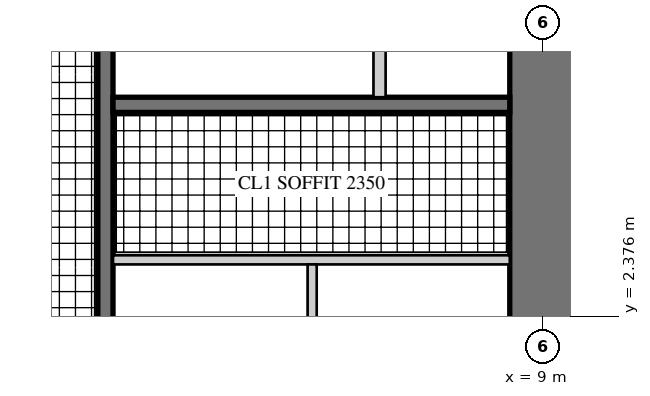
"""IFC4 building model, lengths in metres.
Left out: names, types, materials, properties, quantities, classifications, styles, units other than length and angle.
Written with IfcOpenShell. Run it as: python <this file> out.ifc"""

import sys

from ifc_helpers import new_model, si_unit, direction, frame, frame_2d, origin, place, context, subcontext, project, spatial, rectangle, extrude, element, fill, save


model = new_model("IFC4")
c1 = context("Model", 3, precision=1e-05, world=origin(), true_north=direction((0.0, 1.0)))
c2 = subcontext(c1, "Body", "Model", "MODEL_VIEW")
j1 = project(units=[si_unit("LENGTHUNIT", "METRE"), si_unit("PLANEANGLEUNIT", "RADIAN")], contexts=[c1])
p1 = place(None, origin())
s1 = spatial("IfcSite", under=j1, at=p1, CompositionType="ELEMENT")
p2 = place(p1, origin())
s2 = spatial("IfcBuilding", under=s1, at=p2, CompositionType="ELEMENT")
p3 = place(p2, frame((0.0, 0.0, 189.9)))
s3 = spatial("IfcBuildingStorey", under=s2, at=p3, CompositionType="ELEMENT", Elevation=189.9)
p4 = place(p3, frame((9.0, -9.0, 0.0), z_axis=(0.0, 0.0, 1.0), x_axis=(0.0, 1.0, 0.0)))
e1 = element("IfcWall", 1, at=p4, inside=s3, PredefinedType="SHEAR", context=c2, shape_type="SweptSolid", body=[
    extrude(rectangle(XDim=18.0, YDim=1.1, at=frame_2d((9.0, 0.0))), origin(), (0.0, 0.0, 1.0), 3.4),
])
p5 = place(p4, frame((9.8, 0.0, 0.0)))
e2 = element("IfcOpeningElement", 2, at=p5, cuts=e1, PredefinedType="OPENING", context=c2, shape_type="SweptSolid", body=[
    extrude(rectangle(XDim=1.0, YDim=2.4, at=frame_2d((0.5, 1.2))), frame((0.0, 0.56, 0.0), z_axis=(0.0, -1.0, 0.0), x_axis=(1.0, 0.0, 0.0)), (0.0, 0.0, 1.0), 1.12),
])
p6 = place(p3, frame((1.8, 1.875, 0.0), z_axis=(0.0, 0.0, 1.0), x_axis=(0.0, 1.0, 0.0)))
e3 = element("IfcWall", 3, at=p6, inside=s3, PredefinedType="SHEAR", context=c2, shape_type="SweptSolid", body=[
    extrude(rectangle(XDim=6.575, YDim=0.25, at=frame_2d((3.288, 0.0))), origin(), (0.0, 0.0, 1.0), 3.4),
])
p7 = place(p6, frame((1.875, 0.0, 0.0)))
e4 = element("IfcOpeningElement", 4, at=p7, cuts=e3, PredefinedType="OPENING", context=c2, shape_type="SweptSolid", body=[
    extrude(rectangle(XDim=1.6, YDim=2.4, at=frame_2d((0.8, 1.2))), frame((0.0, 0.135, 0.0), z_axis=(0.0, -1.0, 0.0), x_axis=(1.0, 0.0, 0.0)), (0.0, 0.0, 1.0), 0.27),
])
p8 = place(p3, frame((1.925, 5.85, 0.0), z_axis=(0.0, 0.0, 1.0), x_axis=(1.0, 0.0, 0.0)))
e5 = element("IfcWall", 5, at=p8, inside=s3, PredefinedType="SHEAR", context=c2, shape_type="SweptSolid", body=[
    extrude(rectangle(XDim=6.525, YDim=0.25, at=frame_2d((3.262, 0.0))), origin(), (0.0, 0.0, 1.0), 3.4),
])
p9 = place(p8, frame((0.521, 0.0, 0.0)))
e6 = element("IfcOpeningElement", 6, at=p9, cuts=e5, PredefinedType="OPENING", context=c2, shape_type="SweptSolid", body=[
    extrude(rectangle(XDim=1.0, YDim=2.1, at=frame_2d((0.5, 1.05))), frame((0.0, 0.135, 0.0), z_axis=(0.0, -1.0, 0.0), x_axis=(1.0, 0.0, 0.0)), (0.0, 0.0, 1.0), 0.27),
])
p10 = place(p8, frame((5.004, 0.0, 0.0)))
e7 = element("IfcOpeningElement", 7, at=p10, cuts=e5, PredefinedType="OPENING", context=c2, shape_type="SweptSolid", body=[
    extrude(rectangle(XDim=1.0, YDim=2.1, at=frame_2d((0.5, 1.05))), frame((0.0, 0.135, 0.0), z_axis=(0.0, -1.0, 0.0), x_axis=(1.0, 0.0, 0.0)), (0.0, 0.0, 1.0), 0.27),
])
p11 = place(p3, frame((1.925, 3.3, 0.0), z_axis=(0.0, 0.0, 1.0), x_axis=(1.0, 0.0, 0.0)))
e8 = element("IfcWall", 8, at=p11, inside=s3, PredefinedType="PARTITIONING", context=c2, shape_type="SweptSolid", body=[
    extrude(rectangle(XDim=6.525, YDim=0.15, at=frame_2d((3.262, 0.0))), origin(), (0.0, 0.0, 1.0), 3.4),
])
p12 = place(p11, frame((0.075, 0.0, 0.0)))
e9 = element("IfcOpeningElement", 9, at=p12, cuts=e8, PredefinedType="OPENING", context=c2, shape_type="SweptSolid", body=[
    extrude(rectangle(XDim=0.8, YDim=2.1, at=frame_2d((0.4, 1.05))), frame((0.0, 0.085, 0.0), z_axis=(0.0, -1.0, 0.0), x_axis=(1.0, 0.0, 0.0)), (0.0, 0.0, 1.0), 0.17),
])
p13 = place(p11, frame((3.675, 0.0, 0.0)))
e10 = element("IfcOpeningElement", 10, at=p13, cuts=e8, PredefinedType="OPENING", context=c2, shape_type="SweptSolid", body=[
    extrude(rectangle(XDim=0.8, YDim=2.1, at=frame_2d((0.4, 1.05))), frame((0.0, 0.085, 0.0), z_axis=(0.0, -1.0, 0.0), x_axis=(1.0, 0.0, 0.0)), (0.0, 0.0, 1.0), 0.17),
])
p14 = place(p3, frame((5.2, 2.125, 0.0), z_axis=(0.0, 0.0, 1.0), x_axis=(0.0, 1.0, 0.0)))
e11 = element("IfcWall", 11, at=p14, inside=s3, PredefinedType="PARTITIONING", context=c2, shape_type="SweptSolid", body=[
    extrude(rectangle(XDim=1.1, YDim=0.15, at=frame_2d((0.55, 0.0))), origin(), (0.0, 0.0, 1.0), 3.4),
])
p15 = place(p3, frame((6.308, 5.975, 0.0), z_axis=(0.0, 0.0, 1.0), x_axis=(0.0, 1.0, 0.0)))
e12 = element("IfcWall", 12, at=p15, inside=s3, PredefinedType="PARTITIONING", context=c2, shape_type="SweptSolid", body=[
    extrude(rectangle(XDim=2.475, YDim=0.2, at=frame_2d((1.237, 0.0))), origin(), (0.0, 0.0, 1.0), 3.4),
])
p16 = place(p7, frame((1.6, 0.0, 0.0), z_axis=(0.0, 0.0, 1.0), x_axis=(-1.0, 0.0, 0.0)))
e13 = element("IfcDoor", 13, at=p16, inside=s3, OperationType="DOUBLE_DOOR_SINGLE_SWING", PredefinedType="DOOR", context=c2, shape_type="SweptSolid", body=[
    extrude(rectangle(XDim=1.6, YDim=2.4, at=frame_2d((0.8, 1.2))), frame((0.0, 0.025, 0.0), z_axis=(0.0, -1.0, 0.0), x_axis=(1.0, 0.0, 0.0)), (0.0, 0.0, 1.0), 0.05),
])
fill(e4, e13)
p17 = place(p12, frame((0.8, 0.0, 0.0), z_axis=(0.0, 0.0, 1.0), x_axis=(-1.0, 0.0, 0.0)))
e14 = element("IfcDoor", 14, at=p17, inside=s3, OperationType="SINGLE_SWING_RIGHT", PredefinedType="DOOR", context=c2, shape_type="SweptSolid", body=[
    extrude(rectangle(XDim=0.8, YDim=2.1, at=frame_2d((0.4, 1.05))), frame((0.0, 0.025, 0.0), z_axis=(0.0, -1.0, 0.0), x_axis=(1.0, 0.0, 0.0)), (0.0, 0.0, 1.0), 0.05),
])
fill(e9, e14)
p18 = place(p13, frame((0.8, 0.0, 0.0), z_axis=(0.0, 0.0, 1.0), x_axis=(-1.0, 0.0, 0.0)))
e15 = element("IfcDoor", 15, at=p18, inside=s3, OperationType="SINGLE_SWING_RIGHT", PredefinedType="DOOR", context=c2, shape_type="SweptSolid", body=[
    extrude(rectangle(XDim=0.8, YDim=2.1, at=frame_2d((0.4, 1.05))), frame((0.0, 0.025, 0.0), z_axis=(0.0, -1.0, 0.0), x_axis=(1.0, 0.0, 0.0)), (0.0, 0.0, 1.0), 0.05),
])
fill(e10, e15)
p19 = place(p9, origin())
e16 = element("IfcDoor", 16, at=p19, inside=s3, OperationType="SINGLE_SWING_LEFT", PredefinedType="DOOR", context=c2, shape_type="SweptSolid", body=[
    extrude(rectangle(XDim=1.0, YDim=2.1, at=frame_2d((0.5, 1.05))), frame((0.0, 0.025, 0.0), z_axis=(0.0, -1.0, 0.0), x_axis=(1.0, 0.0, 0.0)), (0.0, 0.0, 1.0), 0.05),
])
fill(e6, e16)
p20 = place(p10, origin())
e17 = element("IfcDoor", 17, at=p20, inside=s3, OperationType="SINGLE_SWING_RIGHT", PredefinedType="DOOR", context=c2, shape_type="SweptSolid", body=[
    extrude(rectangle(XDim=1.0, YDim=2.1, at=frame_2d((0.5, 1.05))), frame((0.0, 0.025, 0.0), z_axis=(0.0, -1.0, 0.0), x_axis=(1.0, 0.0, 0.0)), (0.0, 0.0, 1.0), 0.05),
])
fill(e7, e17)
save(model, sys.argv[1])
